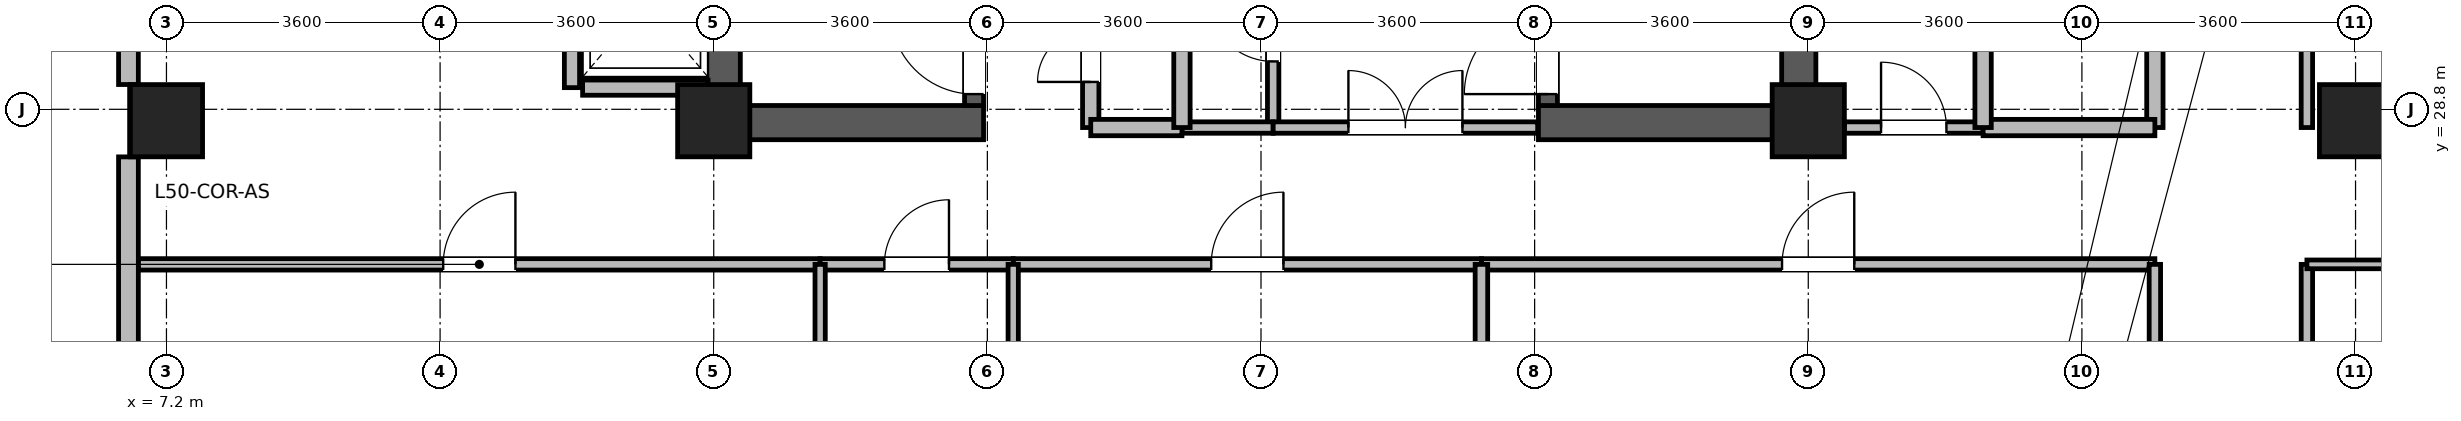
"""IFC4 building model, lengths in metres.
Left out: names, types, materials, properties, quantities, classifications, styles, units other than length and angle.
Written with IfcOpenShell. Run it as: python <this file> out.ifc"""

import sys

from ifc_helpers import new_model, si_unit, direction, frame, frame_2d, origin, origin_2d, place, context, subcontext, project, spatial, rectangle, extrude, source, transform, mapped, element, fill, save


model = new_model("IFC4")
c1 = context("Model", 3, precision=1e-05, world=origin(), true_north=direction((0.0, 1.0)))
c2 = subcontext(c1, "Body", "Model", "MODEL_VIEW")
j1 = project(units=[si_unit("LENGTHUNIT", "METRE"), si_unit("PLANEANGLEUNIT", "RADIAN")], contexts=[c1])
p1 = place(None, origin())
s1 = spatial("IfcSite", under=j1, at=p1, CompositionType="ELEMENT")
p2 = place(p1, origin())
s2 = spatial("IfcBuilding", under=s1, at=p2, CompositionType="ELEMENT")
p3 = place(p2, frame((0.0, 0.0, 197.2)))
s3 = spatial("IfcBuildingStorey", under=s2, at=p3, CompositionType="ELEMENT", Elevation=197.2)
for number, where, z_axis, x_axis in (
    (1, (14.525, 28.4, 0.0), (0.0, 0.0, 1.0), (0.0, 1.0, 0.0)),
    (2, (28.675, 28.4, 0.0), (0.0, 0.0, 1.0), (0.0, 1.0, 0.0)),
):
    element("IfcWall", number, at=place(p3, frame(where, z_axis=z_axis, x_axis=x_axis)), inside=s3, PredefinedType="SHEAR", context=c2, shape_type="SweptSolid", body=[
        extrude(rectangle(XDim=7.9, YDim=0.45, at=frame_2d((3.95, 0.0))), origin(), (0.0, 0.0, 1.0), 4.37),
    ])
for number, where, z_axis, x_axis in (
    (3, (14.75, 28.625, 0.0), (0.0, 0.0, 1.0), (1.0, 0.0, 0.0)),
    (4, (25.25, 28.625, 0.0), (0.0, 0.0, 1.0), (1.0, 0.0, 0.0)),
):
    element("IfcWall", number, at=place(p3, frame(where, z_axis=z_axis, x_axis=x_axis)), inside=s3, PredefinedType="SHEAR", context=c2, shape_type="SweptSolid", body=[
        extrude(rectangle(XDim=3.2, YDim=0.45, at=frame_2d((1.6, 0.0))), origin(), (0.0, 0.0, 1.0), 4.37),
    ])
p4 = place(p3, frame((17.825, 28.85, 0.0), z_axis=(0.0, 0.0, 1.0), x_axis=(0.0, 1.0, 0.0)))
e5 = element("IfcWall", 5, at=p4, inside=s3, PredefinedType="SHEAR", context=c2, shape_type="SweptSolid", body=[
    extrude(rectangle(XDim=7.0, YDim=0.25, at=frame_2d((3.5, 0.0))), origin(), (0.0, 0.0, 1.0), 4.37),
])
p5 = place(p4, frame((0.15, 0.0, 0.0)))
e6 = element("IfcOpeningElement", 6, at=p5, cuts=e5, PredefinedType="OPENING", context=c2, shape_type="SweptSolid", body=[
    extrude(rectangle(XDim=1.1, YDim=2.08, at=frame_2d((0.55, 1.04))), frame((0.0, 0.135, 0.0), z_axis=(0.0, -1.0, 0.0), x_axis=(1.0, 0.0, 0.0)), (0.0, 0.0, 1.0), 0.27),
])
p6 = place(p3, frame((25.375, 28.85, 0.0), z_axis=(0.0, 0.0, 1.0), x_axis=(0.0, 1.0, 0.0)))
e7 = element("IfcWall", 7, at=p6, inside=s3, PredefinedType="SHEAR", context=c2, shape_type="SweptSolid", body=[
    extrude(rectangle(XDim=7.0, YDim=0.25, at=frame_2d((3.5, 0.0))), origin(), (0.0, 0.0, 1.0), 4.37),
])
p7 = place(p6, frame((0.15, 0.0, 0.0)))
e8 = element("IfcOpeningElement", 8, at=p7, cuts=e7, PredefinedType="OPENING", context=c2, shape_type="SweptSolid", body=[
    extrude(rectangle(XDim=1.1, YDim=2.08, at=frame_2d((0.55, 1.04))), frame((0.0, 0.135, 0.0), z_axis=(0.0, -1.0, 0.0), x_axis=(1.0, 0.0, 0.0)), (0.0, 0.0, 1.0), 0.27),
])
m1 = source(origin(), c2, "Body", "SweptSolid", [
    extrude(rectangle(XDim=0.95, YDim=0.95, at=origin_2d()), origin(), (0.0, 0.0, 1.0), 4.6),
])
for number, where, z_axis, x_axis in (
    (9, (7.2, 28.65, 0.0), (0.0, 0.0, 1.0), (1.0, 0.0, 0.0)),
    (10, (14.4, 28.65, 0.0), (0.0, 0.0, 1.0), (1.0, 0.0, 0.0)),
    (11, (28.8, 28.65, 0.0), (0.0, 0.0, 1.0), (1.0, 0.0, 0.0)),
    (12, (36.0, 28.65, 0.0), (0.0, 0.0, 1.0), (1.0, 0.0, 0.0)),
):
    element("IfcColumn", number, at=place(p3, frame(where, z_axis=z_axis, x_axis=x_axis)), inside=s3, PredefinedType="COLUMN", context=c2, shape_type="MappedRepresentation", body=[
        mapped(m1, transform((0.0, 0.0, 0.0), x_axis=(1.0, 0.0, 0.0), y_axis=(0.0, 1.0, 0.0), z_axis=(0.0, 0.0, 1.0), scale=1.0)),
    ])
p8 = place(p3, frame((6.7, 29.126, 0.0), z_axis=(0.0, 0.0, 1.0), x_axis=(0.0, 1.0, 0.0)))
e13 = element("IfcWall", 13, at=p8, inside=s3, PredefinedType="STANDARD", context=c2, shape_type="SweptSolid", body=[
    extrude(rectangle(XDim=6.548, YDim=0.26, at=frame_2d((3.274, 0.0))), origin(), (0.0, 0.0, 1.0), 4.35),
])
p9 = place(p8, frame((2.799, 0.0, 0.85)))
e14 = element("IfcOpeningElement", 14, at=p9, cuts=e13, PredefinedType="OPENING", context=c2, shape_type="SweptSolid", body=[
    extrude(rectangle(XDim=0.95, YDim=1.75, at=frame_2d((0.475, 0.875))), frame((0.0, 0.14, 0.0), z_axis=(0.0, -1.0, 0.0), x_axis=(1.0, 0.0, 0.0)), (0.0, 0.0, 1.0), 0.28),
])
p10 = place(p8, frame((1.175, 0.0, 0.85)))
e15 = element("IfcOpeningElement", 15, at=p10, cuts=e13, PredefinedType="OPENING", context=c2, shape_type="SweptSolid", body=[
    extrude(rectangle(XDim=0.95, YDim=1.75, at=frame_2d((0.475, 0.875))), frame((0.0, 0.14, 0.0), z_axis=(0.0, -1.0, 0.0), x_axis=(1.0, 0.0, 0.0)), (0.0, 0.0, 1.0), 0.28),
])
p11 = place(p3, frame((6.7, 21.47, 0.0), z_axis=(0.0, 0.0, 1.0), x_axis=(0.0, 1.0, 0.0)))
e16 = element("IfcWall", 16, at=p11, inside=s3, PredefinedType="STANDARD", context=c2, shape_type="SweptSolid", body=[
    extrude(rectangle(XDim=6.704, YDim=0.26, at=frame_2d((3.352, 0.0))), origin(), (0.0, 0.0, 1.0), 4.35),
])
p12 = place(p11, frame((2.877, 0.0, 0.85)))
e17 = element("IfcOpeningElement", 17, at=p12, cuts=e16, PredefinedType="OPENING", context=c2, shape_type="SweptSolid", body=[
    extrude(rectangle(XDim=0.95, YDim=1.75, at=frame_2d((0.475, 0.875))), frame((0.0, 0.14, 0.0), z_axis=(0.0, -1.0, 0.0), x_axis=(1.0, 0.0, 0.0)), (0.0, 0.0, 1.0), 0.28),
])
p13 = place(p3, frame((12.675, 29.085, 0.0), z_axis=(0.0, 0.0, 1.0), x_axis=(1.0, 0.0, 0.0)))
e18 = element("IfcWall", 18, at=p13, inside=s3, PredefinedType="PARTITIONING", context=c2, shape_type="SweptSolid", body=[
    extrude(rectangle(XDim=1.65, YDim=0.2, at=frame_2d((0.825, 0.0))), origin(), (0.0, 0.0, 1.0), 4.35),
])
p14 = place(p3, frame((12.535, 29.085, 0.0), z_axis=(0.0, 0.0, 1.0), x_axis=(0.0, 1.0, 0.0)))
e19 = element("IfcWall", 19, at=p14, inside=s3, PredefinedType="PARTITIONING", context=c2, shape_type="SweptSolid", body=[
    extrude(rectangle(XDim=2.23, YDim=0.2, at=frame_2d((1.115, 0.0))), origin(), (0.0, 0.0, 1.0), 4.35),
])
p15 = place(p3, frame((35.36, 16.96, 0.0), z_axis=(0.0, 0.0, 1.0), x_axis=(0.0, 1.0, 0.0)))
e20 = element("IfcWall", 20, at=p15, inside=s3, PredefinedType="PARTITIONING", context=c2, shape_type="SweptSolid", body=[
    extrude(rectangle(XDim=9.8, YDim=0.15, at=frame_2d((4.9, 0.0))), origin(), (0.0, 0.0, 1.0), 4.35),
])
p16 = place(p3, frame((6.832, 26.76, 0.0), z_axis=(0.0, 0.0, 1.0), x_axis=(1.0, 0.0, 0.0)))
e21 = element("IfcWall", 21, at=p16, inside=s3, PredefinedType="PARTITIONING", context=c2, shape_type="SweptSolid", body=[
    extrude(rectangle(XDim=8.968, YDim=0.15, at=frame_2d((4.484, 0.0))), origin(), (0.0, 0.0, 1.0), 4.35),
])
p17 = place(p16, frame((4.009, 0.0, 0.0)))
e22 = element("IfcOpeningElement", 22, at=p17, cuts=e21, PredefinedType="OPENING", context=c2, shape_type="SweptSolid", body=[
    extrude(rectangle(XDim=0.95, YDim=2.1, at=frame_2d((0.475, 1.05))), frame((0.0, 0.085, 0.0), z_axis=(0.0, -1.0, 0.0), x_axis=(1.0, 0.0, 0.0)), (0.0, 0.0, 1.0), 0.17),
])
p18 = place(p3, frame((24.5, 26.76, 0.0), z_axis=(0.0, 0.0, 1.0), x_axis=(1.0, 0.0, 0.0)))
e23 = element("IfcWall", 23, at=p18, inside=s3, PredefinedType="PARTITIONING", context=c2, shape_type="SweptSolid", body=[
    extrude(rectangle(XDim=8.86, YDim=0.15, at=frame_2d((4.43, 0.0))), origin(), (0.0, 0.0, 1.0), 4.35),
])
p19 = place(p18, frame((3.955, 0.0, 0.0)))
e24 = element("IfcOpeningElement", 24, at=p19, cuts=e23, PredefinedType="OPENING", context=c2, shape_type="SweptSolid", body=[
    extrude(rectangle(XDim=0.95, YDim=2.1, at=frame_2d((0.475, 1.05))), frame((0.0, 0.085, 0.0), z_axis=(0.0, -1.0, 0.0), x_axis=(1.0, 0.0, 0.0)), (0.0, 0.0, 1.0), 0.17),
])
p20 = place(p3, frame((35.36, 28.56, 0.0), z_axis=(0.0, 0.0, 1.0), x_axis=(0.0, 1.0, 0.0)))
e25 = element("IfcWall", 25, at=p20, inside=s3, PredefinedType="PARTITIONING", context=c2, shape_type="SweptSolid", body=[
    extrude(rectangle(XDim=7.68, YDim=0.15, at=frame_2d((3.84, 0.0))), origin(), (0.0, 0.0, 1.0), 4.35),
])
p21 = place(p20, frame((3.19, 0.0, 0.0)))
e26 = element("IfcOpeningElement", 26, at=p21, cuts=e25, PredefinedType="OPENING", context=c2, shape_type="SweptSolid", body=[
    extrude(rectangle(XDim=1.3, YDim=2.12, at=frame_2d((0.65, 1.06))), frame((0.0, 0.085, 0.0), z_axis=(0.0, -1.0, 0.0), x_axis=(1.0, 0.0, 0.0)), (0.0, 0.0, 1.0), 0.17),
])
p22 = place(p3, frame((18.34, 26.76, 0.0), z_axis=(0.0, 0.0, 1.0), x_axis=(1.0, 0.0, 0.0)))
e27 = element("IfcWall", 27, at=p22, inside=s3, PredefinedType="PARTITIONING", context=c2, shape_type="SweptSolid", body=[
    extrude(rectangle(XDim=6.16, YDim=0.15, at=frame_2d((3.08, 0.0))), origin(), (0.0, 0.0, 1.0), 4.35),
])
p23 = place(p22, frame((2.605, 0.0, 0.0)))
e28 = element("IfcOpeningElement", 28, at=p23, cuts=e27, PredefinedType="OPENING", context=c2, shape_type="SweptSolid", body=[
    extrude(rectangle(XDim=0.95, YDim=2.1, at=frame_2d((0.475, 1.05))), frame((0.0, 0.085, 0.0), z_axis=(0.0, -1.0, 0.0), x_axis=(1.0, 0.0, 0.0)), (0.0, 0.0, 1.0), 0.17),
])
p24 = place(p3, frame((33.36, 28.56, 0.0), z_axis=(0.0, 0.0, 1.0), x_axis=(0.0, 1.0, 0.0)))
e29 = element("IfcWall", 29, at=p24, inside=s3, PredefinedType="PARTITIONING", context=c2, shape_type="SweptSolid", body=[
    extrude(rectangle(XDim=3.84, YDim=0.215, at=frame_2d((1.92, 0.0))), origin(), (0.0, 0.0, 1.0), 4.35),
])
p25 = place(p24, frame((1.22, 0.0, 0.0)))
e30 = element("IfcOpeningElement", 30, at=p25, cuts=e29, PredefinedType="OPENING", context=c2, shape_type="SweptSolid", body=[
    extrude(rectangle(XDim=1.4, YDim=2.15, at=frame_2d((0.7, 1.075))), frame((0.0, 0.118, 0.0), z_axis=(0.0, -1.0, 0.0), x_axis=(1.0, 0.0, 0.0)), (0.0, 0.0, 1.0), 0.235),
])
p26 = place(p3, frame((33.36, 23.5, 0.0), z_axis=(0.0, 0.0, 1.0), x_axis=(0.0, 1.0, 0.0)))
e31 = element("IfcWall", 31, at=p26, inside=s3, PredefinedType="PARTITIONING", context=c2, shape_type="SweptSolid", body=[
    extrude(rectangle(XDim=3.26, YDim=0.15, at=frame_2d((1.63, 0.0))), origin(), (0.0, 0.0, 1.0), 4.35),
])
p27 = place(p3, frame((19.36, 28.56, 0.0), z_axis=(0.0, 0.0, 1.0), x_axis=(0.0, 1.0, 0.0)))
e32 = element("IfcWall", 32, at=p27, inside=s3, PredefinedType="PARTITIONING", context=c2, shape_type="SweptSolid", body=[
    extrude(rectangle(XDim=2.6, YDim=0.215, at=frame_2d((1.3, 0.0))), origin(), (0.0, 0.0, 1.0), 4.35),
])
p28 = place(p27, frame((0.6, 0.0, 0.0)))
e33 = element("IfcOpeningElement", 33, at=p28, cuts=e32, PredefinedType="OPENING", context=c2, shape_type="SweptSolid", body=[
    extrude(rectangle(XDim=1.4, YDim=2.15, at=frame_2d((0.7, 1.075))), frame((0.0, 0.118, 0.0), z_axis=(0.0, -1.0, 0.0), x_axis=(1.0, 0.0, 0.0)), (0.0, 0.0, 1.0), 0.235),
])
p29 = place(p3, frame((21.76, 28.56, 0.0), z_axis=(0.0, 0.0, 1.0), x_axis=(0.0, 1.0, 0.0)))
e34 = element("IfcWall", 34, at=p29, inside=s3, PredefinedType="PARTITIONING", context=c2, shape_type="SweptSolid", body=[
    extrude(rectangle(XDim=2.6, YDim=0.15, at=frame_2d((1.3, 0.0))), origin(), (0.0, 0.0, 1.0), 4.35),
])
p30 = place(p29, frame((0.87, 0.0, 0.0)))
e35 = element("IfcOpeningElement", 35, at=p30, cuts=e34, PredefinedType="OPENING", context=c2, shape_type="SweptSolid", body=[
    extrude(rectangle(XDim=0.86, YDim=2.02, at=frame_2d((0.43, 1.01))), frame((0.0, 0.085, 0.0), z_axis=(0.0, -1.0, 0.0), x_axis=(1.0, 0.0, 0.0)), (0.0, 0.0, 1.0), 0.17),
])
p31 = place(p3, frame((15.8, 26.76, 0.0), z_axis=(0.0, 0.0, 1.0), x_axis=(1.0, 0.0, 0.0)))
e36 = element("IfcWall", 36, at=p31, inside=s3, PredefinedType="PARTITIONING", context=c2, shape_type="SweptSolid", body=[
    extrude(rectangle(XDim=2.54, YDim=0.15, at=frame_2d((1.27, 0.0))), origin(), (0.0, 0.0, 1.0), 4.35),
])
p32 = place(p31, frame((0.845, 0.0, 0.0)))
e37 = element("IfcOpeningElement", 37, at=p32, cuts=e36, PredefinedType="OPENING", context=c2, shape_type="SweptSolid", body=[
    extrude(rectangle(XDim=0.85, YDim=2.04, at=frame_2d((0.425, 1.02))), frame((0.0, 0.085, 0.0), z_axis=(0.0, -1.0, 0.0), x_axis=(1.0, 0.0, 0.0)), (0.0, 0.0, 1.0), 0.17),
])
p33 = place(p3, frame((29.275, 28.56, 0.0), z_axis=(0.0, 0.0, 1.0), x_axis=(1.0, 0.0, 0.0)))
e38 = element("IfcWall", 38, at=p33, inside=s3, PredefinedType="PARTITIONING", context=c2, shape_type="SweptSolid", body=[
    extrude(rectangle(XDim=1.825, YDim=0.15, at=frame_2d((0.913, 0.0))), origin(), (0.0, 0.0, 1.0), 3.75),
])
p34 = place(p33, frame((0.482, 0.0, 0.0)))
e39 = element("IfcOpeningElement", 39, at=p34, cuts=e38, PredefinedType="OPENING", context=c2, shape_type="SweptSolid", body=[
    extrude(rectangle(XDim=0.86, YDim=2.02, at=frame_2d((0.43, 1.01))), frame((0.0, 0.085, 0.0), z_axis=(0.0, -1.0, 0.0), x_axis=(1.0, 0.0, 0.0)), (0.0, 0.0, 1.0), 0.17),
])
p35 = place(p3, frame((31.1, 28.56, 0.0), z_axis=(0.0, 0.0, 1.0), x_axis=(1.0, 0.0, 0.0)))
e40 = element("IfcWall", 40, at=p35, inside=s3, PredefinedType="PARTITIONING", context=c2, shape_type="SweptSolid", body=[
    extrude(rectangle(XDim=2.26, YDim=0.215, at=frame_2d((1.13, 0.0))), origin(), (0.0, 0.0, 1.0), 3.75),
])
p36 = place(p3, frame((20.56, 28.56, 0.0), z_axis=(0.0, 0.0, 1.0), x_axis=(1.0, 0.0, 0.0)))
e41 = element("IfcWall", 41, at=p36, inside=s3, PredefinedType="PARTITIONING", context=c2, shape_type="SweptSolid", body=[
    extrude(rectangle(XDim=1.2, YDim=0.15, at=frame_2d((0.6, 0.0))), origin(), (0.0, 0.0, 1.0), 3.35),
])
p37 = place(p3, frame((19.36, 28.56, 0.0), z_axis=(0.0, 0.0, 1.0), x_axis=(1.0, 0.0, 0.0)))
e42 = element("IfcWall", 42, at=p37, inside=s3, PredefinedType="PARTITIONING", context=c2, shape_type="SweptSolid", body=[
    extrude(rectangle(XDim=1.2, YDim=0.215, at=frame_2d((0.6, 0.0))), origin(), (0.0, 0.0, 1.0), 3.35),
])
p38 = place(p3, frame((35.36, 26.76, 0.0), z_axis=(0.0, 0.0, 1.0), x_axis=(1.0, 0.0, 0.0)))
e43 = element("IfcWall", 43, at=p38, inside=s3, PredefinedType="PARTITIONING", context=c2, shape_type="SweptSolid", body=[
    extrude(rectangle(XDim=10.58, YDim=0.115, at=frame_2d((5.29, 0.0))), origin(), (0.0, 0.0, 1.0), 4.35),
])
for number, where, z_axis, x_axis in (
    (44, (15.8, 21.732, 0.0), (0.0, 0.0, 1.0), (0.0, 1.0, 0.0)),
    (45, (18.34, 21.732, 0.0), (0.0, 0.0, 1.0), (0.0, 1.0, 0.0)),
):
    element("IfcWall", number, at=place(p3, frame(where, z_axis=z_axis, x_axis=x_axis)), inside=s3, PredefinedType="PARTITIONING", context=c2, shape_type="SweptSolid", body=[
        extrude(rectangle(XDim=5.028, YDim=0.135, at=frame_2d((2.514, 0.0))), origin(), (0.0, 0.0, 1.0), 4.35),
    ])
p39 = place(p3, frame((24.5, 21.732, 0.0), z_axis=(0.0, 0.0, 1.0), x_axis=(0.0, 1.0, 0.0)))
e46 = element("IfcWall", 46, at=p39, inside=s3, PredefinedType="PARTITIONING", context=c2, shape_type="SweptSolid", body=[
    extrude(rectangle(XDim=5.028, YDim=0.165, at=frame_2d((2.514, 0.0))), origin(), (0.0, 0.0, 1.0), 4.35),
])
p40 = place(p3, frame((31.1, 28.56, 0.0), z_axis=(0.0, 0.0, 1.0), x_axis=(0.0, 1.0, 0.0)))
e47 = element("IfcWall", 47, at=p40, inside=s3, PredefinedType="PARTITIONING", context=c2, shape_type="SweptSolid", body=[
    extrude(rectangle(XDim=3.84, YDim=0.215, at=frame_2d((1.92, 0.0))), origin(), (0.0, 0.0, 1.0), 4.35),
])
p41 = place(p3, frame((21.76, 28.56, 0.0), z_axis=(0.0, 0.0, 1.0), x_axis=(1.0, 0.0, 0.0)))
e48 = element("IfcWall", 48, at=p41, inside=s3, PredefinedType="PARTITIONING", context=c2, shape_type="SweptSolid", body=[
    extrude(rectangle(XDim=3.48, YDim=0.15, at=frame_2d((1.74, 0.0))), origin(), (0.0, 0.0, 1.0), 3.35),
])
p42 = place(p41, frame((0.99, 0.0, 0.0)))
e49 = element("IfcOpeningElement", 49, at=p42, cuts=e48, PredefinedType="OPENING", context=c2, shape_type="SweptSolid", body=[
    extrude(rectangle(XDim=1.5, YDim=2.1, at=frame_2d((0.75, 1.05))), frame((0.0, 0.085, 0.0), z_axis=(0.0, -1.0, 0.0), x_axis=(1.0, 0.0, 0.0)), (0.0, 0.0, 1.0), 0.17),
])
p43 = place(p3, frame((20.56, 28.56, 0.0), z_axis=(0.0, 0.0, 1.0), x_axis=(0.0, 1.0, 0.0)))
e50 = element("IfcWall", 50, at=p43, inside=s3, PredefinedType="PARTITIONING", context=c2, shape_type="SweptSolid", body=[
    extrude(rectangle(XDim=2.6, YDim=0.215, at=frame_2d((1.3, 0.0))), origin(), (0.0, 0.0, 1.0), 4.35),
])
p44 = place(p5, origin())
e51 = element("IfcDoor", 51, at=p44, inside=s3, OperationType="SINGLE_SWING_RIGHT", PredefinedType="DOOR", context=c2, shape_type="SweptSolid", body=[
    extrude(rectangle(XDim=1.1, YDim=2.08, at=frame_2d((0.55, 1.04))), frame((0.0, 0.025, 0.0), z_axis=(0.0, -1.0, 0.0), x_axis=(1.0, 0.0, 0.0)), (0.0, 0.0, 1.0), 0.05),
])
fill(e6, e51)
p45 = place(p7, origin())
e52 = element("IfcDoor", 52, at=p45, inside=s3, OperationType="SINGLE_SWING_LEFT", PredefinedType="DOOR", context=c2, shape_type="SweptSolid", body=[
    extrude(rectangle(XDim=1.1, YDim=2.08, at=frame_2d((0.55, 1.04))), frame((0.0, 0.025, 0.0), z_axis=(0.0, -1.0, 0.0), x_axis=(1.0, 0.0, 0.0)), (0.0, 0.0, 1.0), 0.05),
])
fill(e8, e52)
p46 = place(p17, origin())
e53 = element("IfcDoor", 53, at=p46, inside=s3, OperationType="SINGLE_SWING_RIGHT", PredefinedType="DOOR", context=c2, shape_type="SweptSolid", body=[
    extrude(rectangle(XDim=0.95, YDim=2.1, at=frame_2d((0.475, 1.05))), frame((0.0, 0.025, 0.0), z_axis=(0.0, -1.0, 0.0), x_axis=(1.0, 0.0, 0.0)), (0.0, 0.0, 1.0), 0.05),
])
fill(e22, e53)
p47 = place(p19, origin())
e54 = element("IfcDoor", 54, at=p47, inside=s3, OperationType="SINGLE_SWING_RIGHT", PredefinedType="DOOR", context=c2, shape_type="SweptSolid", body=[
    extrude(rectangle(XDim=0.95, YDim=2.1, at=frame_2d((0.475, 1.05))), frame((0.0, 0.025, 0.0), z_axis=(0.0, -1.0, 0.0), x_axis=(1.0, 0.0, 0.0)), (0.0, 0.0, 1.0), 0.05),
])
fill(e24, e54)
p48 = place(p23, origin())
e55 = element("IfcDoor", 55, at=p48, inside=s3, OperationType="SINGLE_SWING_RIGHT", PredefinedType="DOOR", context=c2, shape_type="SweptSolid", body=[
    extrude(rectangle(XDim=0.95, YDim=2.1, at=frame_2d((0.475, 1.05))), frame((0.0, 0.025, 0.0), z_axis=(0.0, -1.0, 0.0), x_axis=(1.0, 0.0, 0.0)), (0.0, 0.0, 1.0), 0.05),
])
fill(e28, e55)
p49 = place(p28, origin())
e56 = element("IfcDoor", 56, at=p49, inside=s3, OperationType="DOUBLE_DOOR_SINGLE_SWING", PredefinedType="DOOR", context=c2, shape_type="SweptSolid", body=[
    extrude(rectangle(XDim=1.4, YDim=2.15, at=frame_2d((0.7, 1.075))), frame((0.0, 0.025, 0.0), z_axis=(0.0, -1.0, 0.0), x_axis=(1.0, 0.0, 0.0)), (0.0, 0.0, 1.0), 0.05),
])
fill(e33, e56)
p50 = place(p30, origin())
e57 = element("IfcDoor", 57, at=p50, inside=s3, OperationType="SINGLE_SWING_RIGHT", PredefinedType="DOOR", context=c2, shape_type="SweptSolid", body=[
    extrude(rectangle(XDim=0.86, YDim=2.02, at=frame_2d((0.43, 1.01))), frame((0.0, 0.025, 0.0), z_axis=(0.0, -1.0, 0.0), x_axis=(1.0, 0.0, 0.0)), (0.0, 0.0, 1.0), 0.05),
])
fill(e35, e57)
p51 = place(p32, origin())
e58 = element("IfcDoor", 58, at=p51, inside=s3, OperationType="SINGLE_SWING_RIGHT", PredefinedType="DOOR", context=c2, shape_type="SweptSolid", body=[
    extrude(rectangle(XDim=0.85, YDim=2.04, at=frame_2d((0.425, 1.02))), frame((0.0, 0.025, 0.0), z_axis=(0.0, -1.0, 0.0), x_axis=(1.0, 0.0, 0.0)), (0.0, 0.0, 1.0), 0.05),
])
fill(e37, e58)
p52 = place(p34, origin())
e59 = element("IfcDoor", 59, at=p52, inside=s3, OperationType="SINGLE_SWING_LEFT", PredefinedType="DOOR", context=c2, shape_type="SweptSolid", body=[
    extrude(rectangle(XDim=0.86, YDim=2.02, at=frame_2d((0.43, 1.01))), frame((0.0, 0.025, 0.0), z_axis=(0.0, -1.0, 0.0), x_axis=(1.0, 0.0, 0.0)), (0.0, 0.0, 1.0), 0.05),
])
fill(e39, e59)
p53 = place(p42, origin())
e60 = element("IfcDoor", 60, at=p53, inside=s3, OperationType="DOUBLE_DOOR_SINGLE_SWING", PredefinedType="DOOR", context=c2, shape_type="SweptSolid", body=[
    extrude(rectangle(XDim=1.5, YDim=2.1, at=frame_2d((0.75, 1.05))), frame((0.0, 0.025, 0.0), z_axis=(0.0, -1.0, 0.0), x_axis=(1.0, 0.0, 0.0)), (0.0, 0.0, 1.0), 0.05),
])
fill(e49, e60)
save(model, sys.argv[1])
